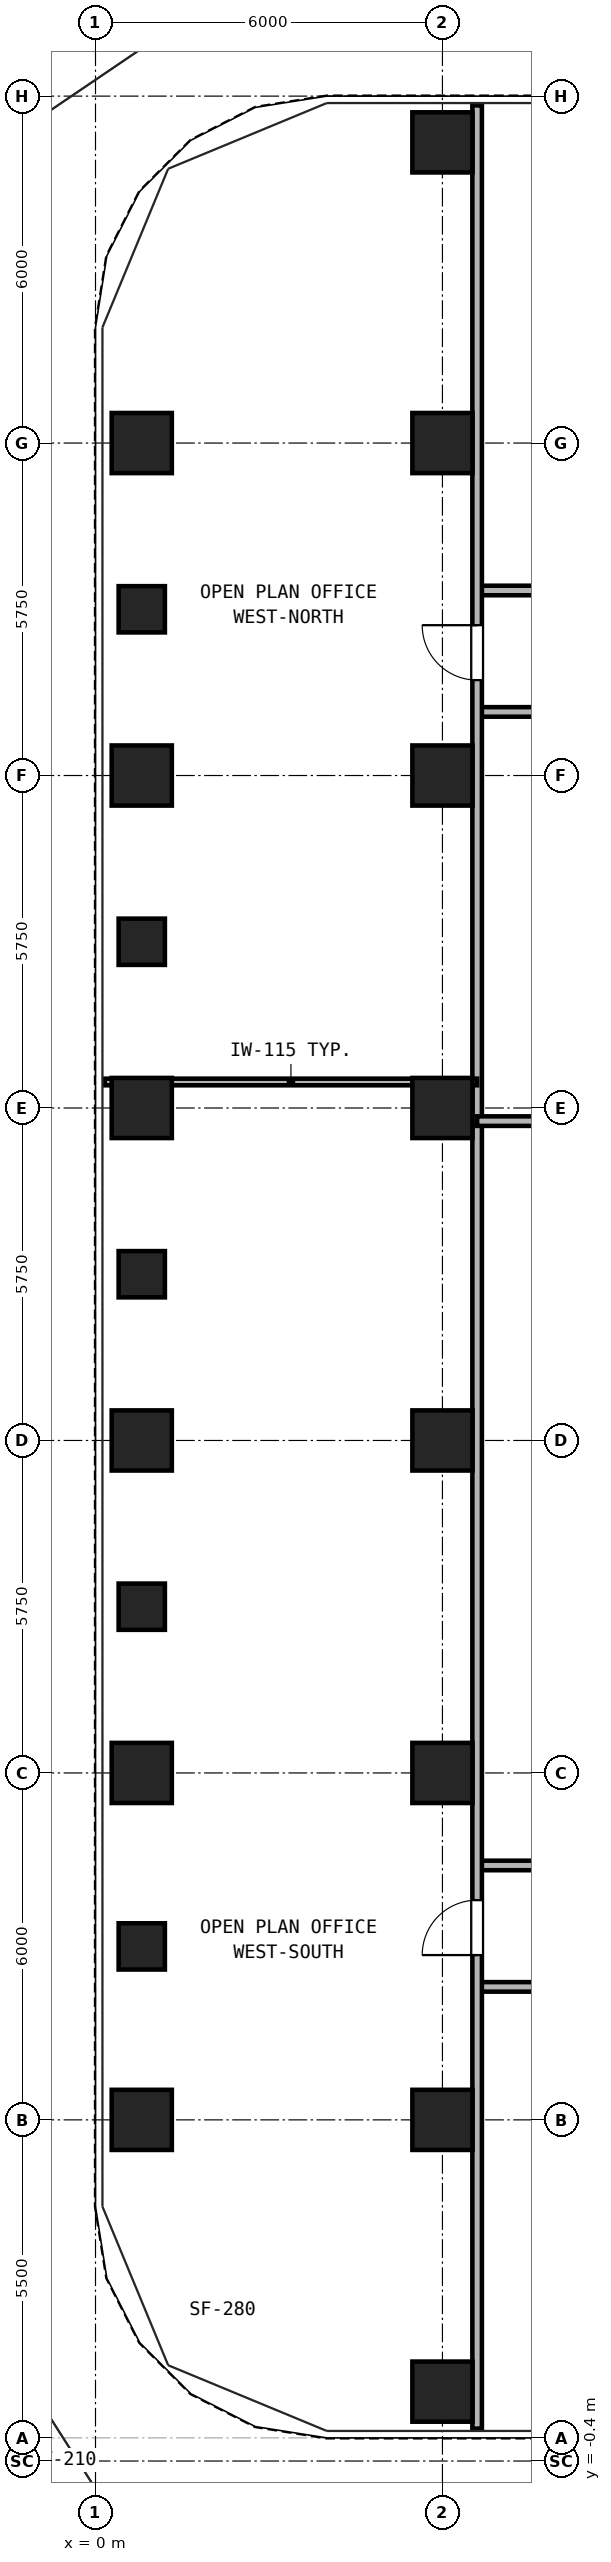
"""IFC4 building model, lengths in metres.
Left out: names, types, materials, properties, quantities, classifications, styles, units other than length and angle.
Written with IfcOpenShell. Run it as: python <this file> out.ifc"""

import sys

from ifc_helpers import new_model, si_unit, direction, frame, frame_2d, origin, origin_2d, place, context, subcontext, project, spatial, rectangle, hollow_rectangle, extrude, source, transform, mapped, element, fill, save


model = new_model("IFC4")
c1 = context("Model", 3, precision=1e-05, world=origin(), true_north=direction((0.0, 1.0)))
c2 = subcontext(c1, "Body", "Model", "MODEL_VIEW")
j1 = project(units=[si_unit("LENGTHUNIT", "METRE"), si_unit("PLANEANGLEUNIT", "RADIAN")], contexts=[c1])
p1 = place(None, origin())
s1 = spatial("IfcSite", under=j1, at=p1, CompositionType="ELEMENT")
p2 = place(p1, origin())
s2 = spatial("IfcBuilding", under=s1, at=p2, CompositionType="ELEMENT")
p3 = place(p2, frame((0.0, 0.0, 84.6)))
s3 = spatial("IfcBuildingStorey", under=s2, at=p3, CompositionType="ELEMENT", Elevation=84.6)
m1 = source(origin(), c2, "Body", "SweptSolid", [
    extrude(hollow_rectangle(XDim=1.04, YDim=1.04, WallThickness=0.065, at=origin_2d()), origin(), (0.0, 0.0, 1.0), 3.24),
])
for number, where, z_axis, x_axis in (
    (1, (6.0, 0.8, 0.0), (0.0, 0.0, 1.0), (1.0, 0.0, 0.0)),
    (2, (6.0, 39.7, 0.0), (0.0, 0.0, 1.0), (1.0, 0.0, 0.0)),
    (3, (0.8, 5.5, 0.0), (0.0, 0.0, 1.0), (1.0, 0.0, 0.0)),
    (4, (0.8, 11.5, 0.0), (0.0, 0.0, 1.0), (1.0, 0.0, 0.0)),
    (5, (0.8, 17.25, 0.0), (0.0, 0.0, 1.0), (1.0, 0.0, 0.0)),
    (6, (0.8, 23.0, 0.0), (0.0, 0.0, 1.0), (1.0, 0.0, 0.0)),
    (7, (0.8, 28.75, 0.0), (0.0, 0.0, 1.0), (1.0, 0.0, 0.0)),
    (8, (0.8, 34.5, 0.0), (0.0, 0.0, 1.0), (1.0, 0.0, 0.0)),
    (9, (6.0, 5.5, 0.0), (0.0, 0.0, 1.0), (1.0, 0.0, 0.0)),
    (10, (6.0, 11.5, 0.0), (0.0, 0.0, 1.0), (1.0, 0.0, 0.0)),
    (11, (6.0, 17.25, 0.0), (0.0, 0.0, 1.0), (1.0, 0.0, 0.0)),
    (12, (6.0, 23.0, 0.0), (0.0, 0.0, 1.0), (1.0, 0.0, 0.0)),
    (13, (6.0, 28.75, 0.0), (0.0, 0.0, 1.0), (1.0, 0.0, 0.0)),
    (14, (6.0, 34.5, 0.0), (0.0, 0.0, 1.0), (1.0, 0.0, 0.0)),
):
    element("IfcColumn", number, at=place(p3, frame(where, z_axis=z_axis, x_axis=x_axis)), inside=s3, PredefinedType="COLUMN", context=c2, shape_type="MappedRepresentation", body=[
        mapped(m1, transform((0.0, 0.0, 0.0), x_axis=(1.0, 0.0, 0.0), y_axis=(0.0, 1.0, 0.0), z_axis=(0.0, 0.0, 1.0), scale=1.0)),
    ])
m2 = source(origin(), c2, "Body", "SweptSolid", [
    extrude(hollow_rectangle(XDim=0.8, YDim=0.8, WallThickness=0.045, at=origin_2d()), origin(), (0.0, 0.0, 1.0), 3.24),
])
for number, where, z_axis, x_axis in (
    (15, (0.8, 8.5, 0.0), (0.0, 0.0, 1.0), (1.0, 0.0, 0.0)),
    (16, (0.8, 14.375, 0.0), (0.0, 0.0, 1.0), (1.0, 0.0, 0.0)),
    (17, (0.8, 20.125, 0.0), (0.0, 0.0, 1.0), (1.0, 0.0, 0.0)),
    (18, (0.8, 25.875, 0.0), (0.0, 0.0, 1.0), (1.0, 0.0, 0.0)),
    (19, (0.8, 31.625, 0.0), (0.0, 0.0, 1.0), (1.0, 0.0, 0.0)),
):
    element("IfcColumn", number, at=place(p3, frame(where, z_axis=z_axis, x_axis=x_axis)), inside=s3, PredefinedType="COLUMN", context=c2, shape_type="MappedRepresentation", body=[
        mapped(m2, transform((0.0, 0.0, 0.0), x_axis=(1.0, 0.0, 0.0), y_axis=(0.0, 1.0, 0.0), z_axis=(0.0, 0.0, 1.0), scale=1.0)),
    ])
p4 = place(p3, frame((6.6, 7.8, 0.0), z_axis=(0.0, 0.0, 1.0), x_axis=(1.0, 0.0, 0.0)))
e20 = element("IfcWall", 20, at=p4, inside=s3, PredefinedType="PARTITIONING", context=c2, shape_type="SweptSolid", body=[
    extrude(rectangle(XDim=33.8, YDim=0.165, at=frame_2d((16.9, 0.0))), origin(), (0.0, 0.0, 1.0), 3.24),
])
p5 = place(p4, frame((2.95, 0.0, 0.0)))
e21 = element("IfcOpeningElement", 21, at=p5, cuts=e20, PredefinedType="OPENING", context=c2, shape_type="SweptSolid", body=[
    extrude(rectangle(XDim=0.95, YDim=2.15, at=frame_2d((0.475, 1.075))), frame((0.0, 0.093, 0.0), z_axis=(0.0, -1.0, 0.0), x_axis=(1.0, 0.0, 0.0)), (0.0, 0.0, 1.0), 0.185),
])
p6 = place(p4, frame((9.9, 0.0, 0.0)))
e22 = element("IfcOpeningElement", 22, at=p6, cuts=e20, PredefinedType="OPENING", context=c2, shape_type="SweptSolid", body=[
    extrude(rectangle(XDim=0.95, YDim=2.15, at=frame_2d((0.475, 1.075))), frame((0.0, 0.093, 0.0), z_axis=(0.0, -1.0, 0.0), x_axis=(1.0, 0.0, 0.0)), (0.0, 0.0, 1.0), 0.185),
])
p7 = place(p4, frame((16.9, 0.0, 0.0)))
e23 = element("IfcOpeningElement", 23, at=p7, cuts=e20, PredefinedType="OPENING", context=c2, shape_type="SweptSolid", body=[
    extrude(rectangle(XDim=0.95, YDim=2.15, at=frame_2d((0.475, 1.075))), frame((0.0, 0.093, 0.0), z_axis=(0.0, -1.0, 0.0), x_axis=(1.0, 0.0, 0.0)), (0.0, 0.0, 1.0), 0.185),
])
p8 = place(p4, frame((23.4, 0.0, 0.0)))
e24 = element("IfcOpeningElement", 24, at=p8, cuts=e20, PredefinedType="OPENING", context=c2, shape_type="SweptSolid", body=[
    extrude(rectangle(XDim=0.95, YDim=2.15, at=frame_2d((0.475, 1.075))), frame((0.0, 0.093, 0.0), z_axis=(0.0, -1.0, 0.0), x_axis=(1.0, 0.0, 0.0)), (0.0, 0.0, 1.0), 0.185),
])
p9 = place(p4, frame((28.25, 0.0, 0.0)))
e25 = element("IfcOpeningElement", 25, at=p9, cuts=e20, PredefinedType="OPENING", context=c2, shape_type="SweptSolid", body=[
    extrude(rectangle(XDim=0.92, YDim=2.1, at=frame_2d((0.46, 1.05))), frame((0.0, 0.093, 0.0), z_axis=(0.0, -1.0, 0.0), x_axis=(1.0, 0.0, 0.0)), (0.0, 0.0, 1.0), 0.185),
])
p10 = place(p4, frame((31.7, 0.0, 0.0)))
e26 = element("IfcOpeningElement", 26, at=p10, cuts=e20, PredefinedType="OPENING", context=c2, shape_type="SweptSolid", body=[
    extrude(rectangle(XDim=0.92, YDim=2.1, at=frame_2d((0.46, 1.05))), frame((0.0, 0.093, 0.0), z_axis=(0.0, -1.0, 0.0), x_axis=(1.0, 0.0, 0.0)), (0.0, 0.0, 1.0), 0.185),
])
p11 = place(p3, frame((6.6, 31.95, 0.0), z_axis=(0.0, 0.0, 1.0), x_axis=(1.0, 0.0, 0.0)))
e27 = element("IfcWall", 27, at=p11, inside=s3, PredefinedType="PARTITIONING", context=c2, shape_type="SweptSolid", body=[
    extrude(rectangle(XDim=33.8, YDim=0.165, at=frame_2d((16.9, 0.0))), origin(), (0.0, 0.0, 1.0), 3.24),
])
p12 = place(p11, frame((3.2, 0.0, 0.0)))
e28 = element("IfcOpeningElement", 28, at=p12, cuts=e27, PredefinedType="OPENING", context=c2, shape_type="SweptSolid", body=[
    extrude(rectangle(XDim=0.95, YDim=2.15, at=frame_2d((0.475, 1.075))), frame((0.0, 0.093, 0.0), z_axis=(0.0, -1.0, 0.0), x_axis=(1.0, 0.0, 0.0)), (0.0, 0.0, 1.0), 0.185),
])
p13 = place(p11, frame((10.65, 0.0, 0.0)))
e29 = element("IfcOpeningElement", 29, at=p13, cuts=e27, PredefinedType="OPENING", context=c2, shape_type="SweptSolid", body=[
    extrude(rectangle(XDim=0.95, YDim=2.15, at=frame_2d((0.475, 1.075))), frame((0.0, 0.093, 0.0), z_axis=(0.0, -1.0, 0.0), x_axis=(1.0, 0.0, 0.0)), (0.0, 0.0, 1.0), 0.185),
])
p14 = place(p11, frame((18.15, 0.0, 0.0)))
e30 = element("IfcOpeningElement", 30, at=p14, cuts=e27, PredefinedType="OPENING", context=c2, shape_type="SweptSolid", body=[
    extrude(rectangle(XDim=0.95, YDim=2.15, at=frame_2d((0.475, 1.075))), frame((0.0, 0.093, 0.0), z_axis=(0.0, -1.0, 0.0), x_axis=(1.0, 0.0, 0.0)), (0.0, 0.0, 1.0), 0.185),
])
p15 = place(p11, frame((25.15, 0.0, 0.0)))
e31 = element("IfcOpeningElement", 31, at=p15, cuts=e27, PredefinedType="OPENING", context=c2, shape_type="SweptSolid", body=[
    extrude(rectangle(XDim=0.95, YDim=2.15, at=frame_2d((0.475, 1.075))), frame((0.0, 0.093, 0.0), z_axis=(0.0, -1.0, 0.0), x_axis=(1.0, 0.0, 0.0)), (0.0, 0.0, 1.0), 0.185),
])
p16 = place(p11, frame((30.85, 0.0, 0.0)))
e32 = element("IfcOpeningElement", 32, at=p16, cuts=e27, PredefinedType="OPENING", context=c2, shape_type="SweptSolid", body=[
    extrude(rectangle(XDim=0.95, YDim=2.15, at=frame_2d((0.475, 1.075))), frame((0.0, 0.093, 0.0), z_axis=(0.0, -1.0, 0.0), x_axis=(1.0, 0.0, 0.0)), (0.0, 0.0, 1.0), 0.185),
])
for number, where, z_axis, x_axis in (
    (33, (6.6, 9.9, 0.0), (0.0, 0.0, 1.0), (1.0, 0.0, 0.0)),
    (34, (6.6, 29.85, 0.0), (0.0, 0.0, 1.0), (1.0, 0.0, 0.0)),
):
    element("IfcWall", number, at=place(p3, frame(where, z_axis=z_axis, x_axis=x_axis)), inside=s3, PredefinedType="PARTITIONING", context=c2, shape_type="SweptSolid", body=[
        extrude(rectangle(XDim=9.7, YDim=0.165, at=frame_2d((4.85, 0.0))), origin(), (0.0, 0.0, 1.0), 3.24),
    ])
p17 = place(p3, frame((6.6, 0.16, 0.0), z_axis=(0.0, 0.0, 1.0), x_axis=(0.0, 1.0, 0.0)))
e35 = element("IfcWall", 35, at=p17, inside=s3, PredefinedType="PARTITIONING", context=c2, shape_type="SweptSolid", body=[
    extrude(rectangle(XDim=40.18, YDim=0.165, at=frame_2d((20.09, 0.0))), origin(), (0.0, 0.0, 1.0), 3.24),
])
p18 = place(p17, frame((8.19, 0.0, 0.0)))
e36 = element("IfcOpeningElement", 36, at=p18, cuts=e35, PredefinedType="OPENING", context=c2, shape_type="SweptSolid", body=[
    extrude(rectangle(XDim=0.95, YDim=2.15, at=frame_2d((0.475, 1.075))), frame((0.0, 0.093, 0.0), z_axis=(0.0, -1.0, 0.0), x_axis=(1.0, 0.0, 0.0)), (0.0, 0.0, 1.0), 0.185),
])
p19 = place(p17, frame((30.24, 0.0, 0.0)))
e37 = element("IfcOpeningElement", 37, at=p19, cuts=e35, PredefinedType="OPENING", context=c2, shape_type="SweptSolid", body=[
    extrude(rectangle(XDim=0.95, YDim=2.15, at=frame_2d((0.475, 1.075))), frame((0.0, 0.093, 0.0), z_axis=(0.0, -1.0, 0.0), x_axis=(1.0, 0.0, 0.0)), (0.0, 0.0, 1.0), 0.185),
])
p20 = place(p3, frame((0.16, 23.45, 0.0), z_axis=(0.0, 0.0, 1.0), x_axis=(1.0, 0.0, 0.0)))
e38 = element("IfcWall", 38, at=p20, inside=s3, PredefinedType="PARTITIONING", context=c2, shape_type="SweptSolid", body=[
    extrude(rectangle(XDim=6.44, YDim=0.115, at=frame_2d((3.22, 0.0))), origin(), (0.0, 0.0, 1.0), 3.24),
])
p21 = place(p3, frame((6.6, 22.773, 0.0), z_axis=(0.0, 0.0, 1.0), x_axis=(1.0, 0.0, 0.0)))
e39 = element("IfcWall", 39, at=p21, inside=s3, PredefinedType="PARTITIONING", context=c2, shape_type="SweptSolid", body=[
    extrude(rectangle(XDim=9.7, YDim=0.165, at=frame_2d((4.85, 0.0))), origin(), (0.0, 0.0, 1.0), 2.459),
])
p22 = place(p18, frame((0.95, 0.0, 0.0), z_axis=(0.0, 0.0, 1.0), x_axis=(-1.0, 0.0, 0.0)))
e40 = element("IfcDoor", 40, at=p22, inside=s3, OperationType="SINGLE_SWING_LEFT", PredefinedType="DOOR", context=c2, shape_type="SweptSolid", body=[
    extrude(rectangle(XDim=0.95, YDim=2.15, at=frame_2d((0.475, 1.075))), frame((0.0, 0.025, 0.0), z_axis=(0.0, -1.0, 0.0), x_axis=(1.0, 0.0, 0.0)), (0.0, 0.0, 1.0), 0.05),
])
fill(e36, e40)
p23 = place(p19, frame((0.95, 0.0, 0.0), z_axis=(0.0, 0.0, 1.0), x_axis=(-1.0, 0.0, 0.0)))
e41 = element("IfcDoor", 41, at=p23, inside=s3, OperationType="SINGLE_SWING_RIGHT", PredefinedType="DOOR", context=c2, shape_type="SweptSolid", body=[
    extrude(rectangle(XDim=0.95, YDim=2.15, at=frame_2d((0.475, 1.075))), frame((0.0, 0.025, 0.0), z_axis=(0.0, -1.0, 0.0), x_axis=(1.0, 0.0, 0.0)), (0.0, 0.0, 1.0), 0.05),
])
fill(e37, e41)
save(model, sys.argv[1])
